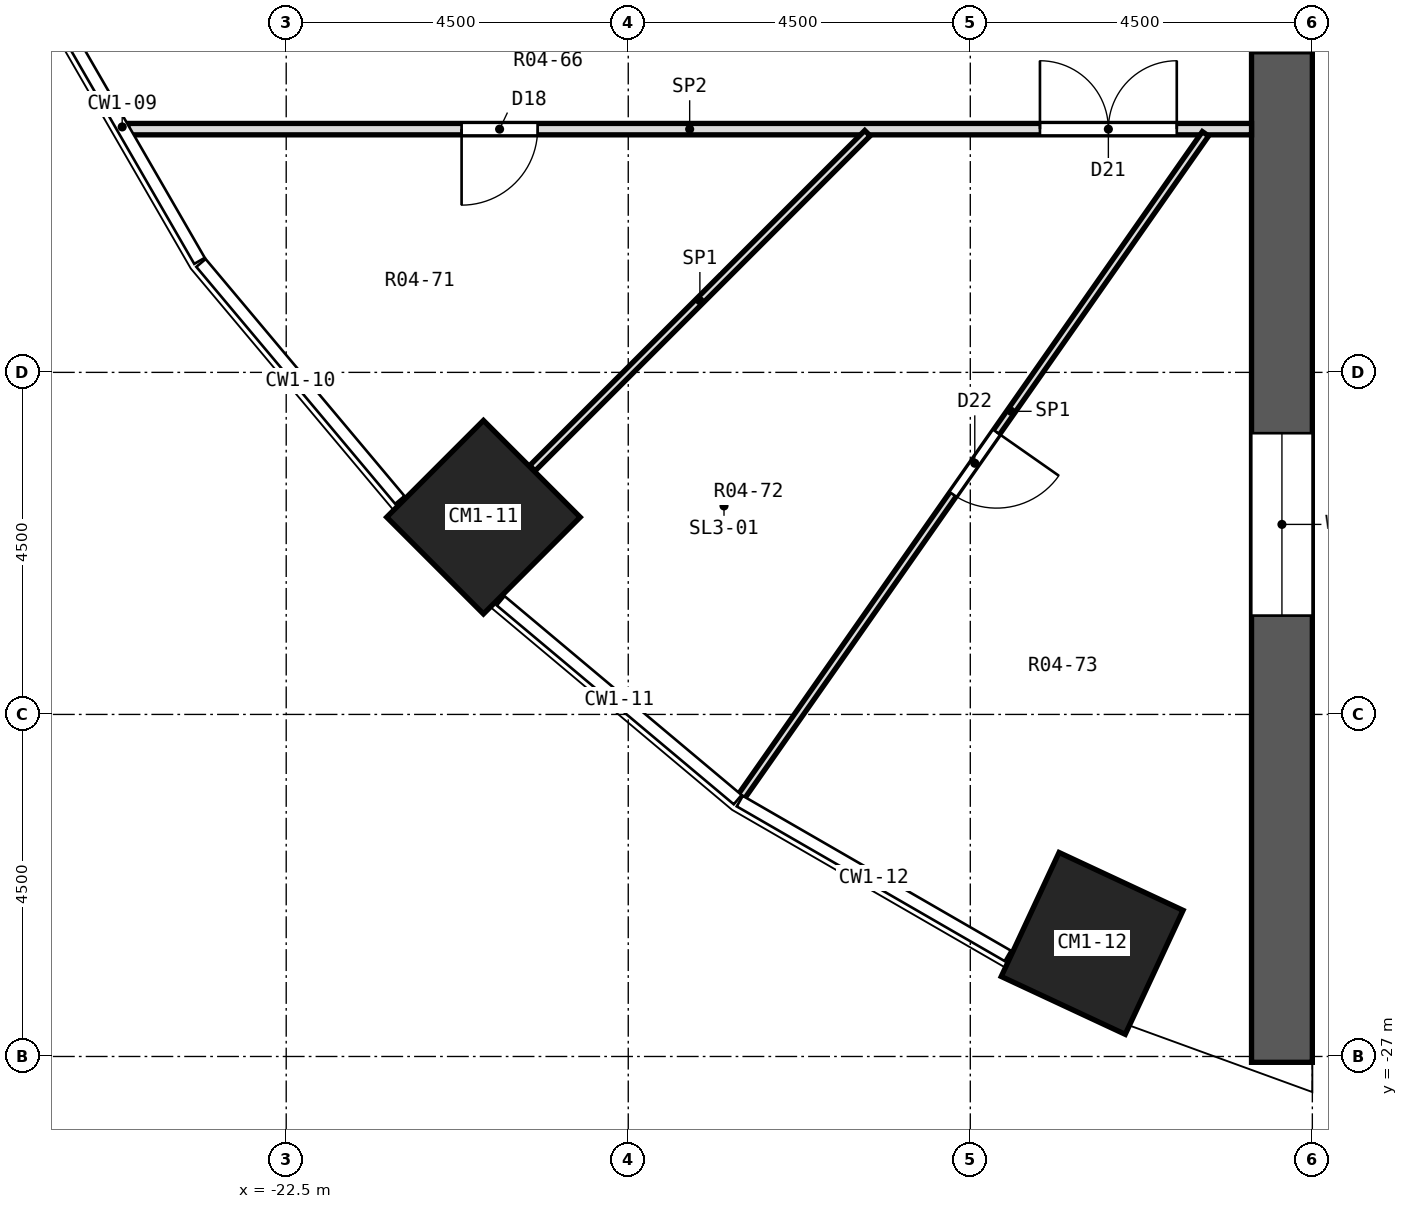
"""IFC4 building model, lengths in metres.
Left out: names, types, materials, properties, quantities, classifications, styles, units other than length and angle.
Written with IfcOpenShell. Run it as: python <this file> out.ifc"""

import sys

from ifc_helpers import new_model, si_unit, direction, frame, frame_2d, origin, origin_2d, place, context, subcontext, project, spatial, polyline, rectangle, outline, extrude, element, fill, save


model = new_model("IFC4")
c1 = context("Model", 3, precision=1e-05, world=origin(), true_north=direction((0.0, 1.0)))
c2 = subcontext(c1, "Body", "Model", "MODEL_VIEW")
j1 = project(units=[si_unit("LENGTHUNIT", "METRE"), si_unit("PLANEANGLEUNIT", "RADIAN")], contexts=[c1])
p1 = place(None, origin())
s1 = spatial("IfcSite", under=j1, at=p1, CompositionType="ELEMENT")
p2 = place(p1, origin())
s2 = spatial("IfcBuilding", under=s1, at=p2, CompositionType="ELEMENT")
p3 = place(p2, frame((0.0, 0.0, 5.0)))
s3 = spatial("IfcBuildingStorey", under=s2, at=p3, CompositionType="ELEMENT", Elevation=5.0)
for number, where, z_axis, x_axis in (
    (1, (-19.905, -19.905, 0.0), (0.0, 0.0, 1.0), (-0.707, -0.707, 0.0)),
    (2, (-11.897, -25.512, 0.0), (0.0, 0.0, 1.0), (-0.423, -0.906, 0.0)),
):
    element("IfcColumn", number, at=place(p3, frame(where, z_axis=z_axis, x_axis=x_axis)), inside=s3, PredefinedType="COLUMN", context=c2, shape_type="SweptSolid", body=[
        extrude(rectangle(XDim=1.8, YDim=1.8, at=origin_2d()), origin(), (0.0, 0.0, 1.0), 4.2),
    ])
p4 = place(p3, frame((-9.4, -27.077, 0.0), z_axis=(0.0, 0.0, 1.0), x_axis=(0.0, 1.0, 0.0)))
e3 = element("IfcWall", 3, at=p4, inside=s3, PredefinedType="SHEAR", context=c2, shape_type="SweptSolid", body=[
    extrude(rectangle(XDim=54.154, YDim=0.8, at=frame_2d((27.077, 0.0))), origin(), (0.0, 0.0, 1.0), 4.2),
])
p5 = place(p4, frame((13.277, 0.0, 0.9)))
e4 = element("IfcOpeningElement", 4, at=p5, cuts=e3, PredefinedType="OPENING", context=c2, shape_type="SweptSolid", body=[
    extrude(rectangle(XDim=2.4, YDim=2.1, at=frame_2d((1.2, 1.05))), frame((0.0, 0.412, 0.0), z_axis=(0.0, -1.0, 0.0), x_axis=(1.0, 0.0, 0.0)), (0.0, 0.0, 1.0), 0.824),
])
p6 = place(p4, frame((17.877, 0.0, 0.9)))
e5 = element("IfcOpeningElement", 5, at=p6, cuts=e3, PredefinedType="OPENING", context=c2, shape_type="SweptSolid", body=[
    extrude(rectangle(XDim=2.4, YDim=2.1, at=frame_2d((1.2, 1.05))), frame((0.0, 0.412, 0.0), z_axis=(0.0, -1.0, 0.0), x_axis=(1.0, 0.0, 0.0)), (0.0, 0.0, 1.0), 0.824),
])
p7 = place(p4, frame((22.477, 0.0, 0.9)))
e6 = element("IfcOpeningElement", 6, at=p7, cuts=e3, PredefinedType="OPENING", context=c2, shape_type="SweptSolid", body=[
    extrude(rectangle(XDim=2.4, YDim=2.1, at=frame_2d((1.2, 1.05))), frame((0.0, 0.412, 0.0), z_axis=(0.0, -1.0, 0.0), x_axis=(1.0, 0.0, 0.0)), (0.0, 0.0, 1.0), 0.824),
])
p8 = place(p4, frame((29.277, 0.0, 0.9)))
e7 = element("IfcOpeningElement", 7, at=p8, cuts=e3, PredefinedType="OPENING", context=c2, shape_type="SweptSolid", body=[
    extrude(rectangle(XDim=2.4, YDim=2.1, at=frame_2d((1.2, 1.05))), frame((0.0, 0.412, 0.0), z_axis=(0.0, -1.0, 0.0), x_axis=(1.0, 0.0, 0.0)), (0.0, 0.0, 1.0), 0.824),
])
p9 = place(p4, frame((33.877, 0.0, 0.9)))
e8 = element("IfcOpeningElement", 8, at=p9, cuts=e3, PredefinedType="OPENING", context=c2, shape_type="SweptSolid", body=[
    extrude(rectangle(XDim=2.4, YDim=2.1, at=frame_2d((1.2, 1.05))), frame((0.0, 0.412, 0.0), z_axis=(0.0, -1.0, 0.0), x_axis=(1.0, 0.0, 0.0)), (0.0, 0.0, 1.0), 0.824),
])
p10 = place(p4, frame((38.477, 0.0, 0.9)))
e9 = element("IfcOpeningElement", 9, at=p10, cuts=e3, PredefinedType="OPENING", context=c2, shape_type="SweptSolid", body=[
    extrude(rectangle(XDim=2.4, YDim=2.1, at=frame_2d((1.2, 1.05))), frame((0.0, 0.412, 0.0), z_axis=(0.0, -1.0, 0.0), x_axis=(1.0, 0.0, 0.0)), (0.0, 0.0, 1.0), 0.824),
])
p11 = place(p4, frame((5.877, 0.0, 0.9)))
e10 = element("IfcOpeningElement", 10, at=p11, cuts=e3, PredefinedType="OPENING", context=c2, shape_type="SweptSolid", body=[
    extrude(rectangle(XDim=2.4, YDim=2.1, at=frame_2d((1.2, 1.05))), frame((0.0, 0.412, 0.0), z_axis=(0.0, -1.0, 0.0), x_axis=(1.0, 0.0, 0.0)), (0.0, 0.0, 1.0), 0.824),
])
p12 = place(p4, frame((45.877, 0.0, 0.9)))
e11 = element("IfcOpeningElement", 11, at=p12, cuts=e3, PredefinedType="OPENING", context=c2, shape_type="SweptSolid", body=[
    extrude(rectangle(XDim=2.4, YDim=2.1, at=frame_2d((1.2, 1.05))), frame((0.0, 0.412, 0.0), z_axis=(0.0, -1.0, 0.0), x_axis=(1.0, 0.0, 0.0)), (0.0, 0.0, 1.0), 0.824),
])
p13 = place(p3, frame((-11.637, -26.498, 0.0), z_axis=(-0.342010332624, -0.939694078188, 0.001992936543), x_axis=(0.000670333127, 0.001876857341, 0.999998014028)))
e12 = element("IfcWall", 12, at=p13, inside=s3, PredefinedType="SOLIDWALL", context=c2, shape_type="SweptSolid", body=[
    extrude(outline(polyline([(0.0, 0.0), (3.65, -2.507e-19), (3.65, -2.81), (4.2, -2.81), (4.2, -3.171), (3.191, -2.977), (2.098, -2.852), (1.0, -2.81), (-3.344e-05, -2.81), (0.0, 0.0)])), origin(), (0.0, 0.0, -1.0), 0.38),
])
p14 = place(p3, frame((-24.583, -14.8, 0.0), z_axis=(0.0, 0.0, 1.0), x_axis=(1.0, 0.0, 0.0)))
e13 = element("IfcWall", 13, at=p14, inside=s3, PredefinedType="PARTITIONING", context=c2, shape_type="SweptSolid", body=[
    extrude(rectangle(XDim=14.783, YDim=0.15, at=frame_2d((7.392, 0.0))), origin(), (0.0, 0.0, 1.0), 3.65),
])
p15 = place(p14, frame((4.39, 0.0, 0.0)))
e14 = element("IfcOpeningElement", 14, at=p15, cuts=e13, PredefinedType="OPENING", context=c2, shape_type="SweptSolid", body=[
    extrude(rectangle(XDim=1.0, YDim=2.1, at=frame_2d((0.5, 1.05))), frame((0.0, 0.087, 0.0), z_axis=(0.0, -1.0, 0.0), x_axis=(1.0, 0.0, 0.0)), (0.0, 0.0, 1.0), 0.174),
])
p16 = place(p14, frame((12.0, 0.0, 0.0)))
e15 = element("IfcOpeningElement", 15, at=p16, cuts=e13, PredefinedType="OPENING", context=c2, shape_type="SweptSolid", body=[
    extrude(rectangle(XDim=1.8, YDim=2.1, at=frame_2d((0.9, 1.05))), frame((0.0, 0.087, 0.0), z_axis=(0.0, -1.0, 0.0), x_axis=(1.0, 0.0, 0.0)), (0.0, 0.0, 1.0), 0.174),
])
p17 = place(p3, frame((-19.262, -19.262, 0.0), z_axis=(0.0, 0.0, 1.0), x_axis=(0.707106781187, 0.707106781187, 0.0)))
e16 = element("IfcWall", 16, at=p17, inside=s3, PredefinedType="PARTITIONING", context=c2, shape_type="SweptSolid", body=[
    extrude(rectangle(XDim=6.235, YDim=0.1, at=frame_2d((3.117, 0.0))), origin(), (0.0, 0.0, 1.0), 3.65),
])
p18 = place(p3, frame((-16.519, -23.591, 0.0), z_axis=(0.0, 0.0, 1.0), x_axis=(0.573602246075, 0.81913397152, 0.0)))
e17 = element("IfcWall", 17, at=p18, inside=s3, PredefinedType="PARTITIONING", context=c2, shape_type="SweptSolid", body=[
    extrude(rectangle(XDim=10.657, YDim=0.1, at=frame_2d((5.329, 0.0))), origin(), (0.0, 0.0, 1.0), 3.65),
])
p19 = place(p18, frame((4.866, 0.0, 0.0)))
e18 = element("IfcOpeningElement", 18, at=p19, cuts=e17, PredefinedType="OPENING", context=c2, shape_type="SweptSolid", body=[
    extrude(rectangle(XDim=1.0, YDim=2.1, at=frame_2d((0.5, 1.05))), frame((0.0, 0.062, 0.0), z_axis=(0.0, -1.0, 0.0), x_axis=(1.0, 0.0, 0.0)), (0.0, 0.0, 1.0), 0.124),
])
p20 = place(p15, frame((1.0, 0.0, 0.0), z_axis=(0.0, 0.0, 1.0), x_axis=(-1.0, 0.0, 0.0)))
e19 = element("IfcDoor", 19, at=p20, inside=s3, OperationType="SINGLE_SWING_RIGHT", PredefinedType="DOOR", context=c2, shape_type="SweptSolid", body=[
    extrude(rectangle(XDim=1.0, YDim=2.1, at=frame_2d((0.5, 1.05))), frame((0.0, 0.025, 0.0), z_axis=(0.0, -1.0, 0.0), x_axis=(1.0, 0.0, 0.0)), (0.0, 0.0, 1.0), 0.05),
])
fill(e14, e19)
p21 = place(p16, origin())
e20 = element("IfcDoor", 20, at=p21, inside=s3, OperationType="DOUBLE_DOOR_SINGLE_SWING", PredefinedType="DOOR", context=c2, shape_type="SweptSolid", body=[
    extrude(rectangle(XDim=1.8, YDim=2.1, at=frame_2d((0.9, 1.05))), frame((0.0, 0.025, 0.0), z_axis=(0.0, -1.0, 0.0), x_axis=(1.0, 0.0, 0.0)), (0.0, 0.0, 1.0), 0.05),
])
fill(e15, e20)
p22 = place(p19, frame((1.0, 0.0, 0.0), z_axis=(0.0, 0.0, 1.0), x_axis=(-1.0, 0.0, 0.0)))
e21 = element("IfcDoor", 21, at=p22, inside=s3, OperationType="SINGLE_SWING_LEFT", PredefinedType="DOOR", context=c2, shape_type="SweptSolid", body=[
    extrude(rectangle(XDim=1.0, YDim=2.1, at=frame_2d((0.5, 1.05))), frame((0.0, 0.025, 0.0), z_axis=(0.0, -1.0, 0.0), x_axis=(1.0, 0.0, 0.0)), (0.0, 0.0, 1.0), 0.05),
])
fill(e18, e21)
p23 = place(p5, origin())
e22 = element("IfcWindow", 22, at=p23, inside=s3, PartitioningType="SINGLE_PANEL", PredefinedType="WINDOW", context=c2, shape_type="SweptSolid", body=[
    extrude(rectangle(XDim=2.4, YDim=2.1, at=frame_2d((1.2, 1.05))), frame((0.0, 0.03, 0.0), z_axis=(0.0, -1.0, 0.0), x_axis=(1.0, 0.0, 0.0)), (0.0, 0.0, 1.0), 0.06),
])
fill(e4, e22)
p24 = place(p11, origin())
e23 = element("IfcWindow", 23, at=p24, inside=s3, PartitioningType="SINGLE_PANEL", PredefinedType="WINDOW", context=c2, shape_type="SweptSolid", body=[
    extrude(rectangle(XDim=2.4, YDim=2.1, at=frame_2d((1.2, 1.05))), frame((0.0, 0.03, 0.0), z_axis=(0.0, -1.0, 0.0), x_axis=(1.0, 0.0, 0.0)), (0.0, 0.0, 1.0), 0.06),
])
fill(e10, e23)
save(model, sys.argv[1])
